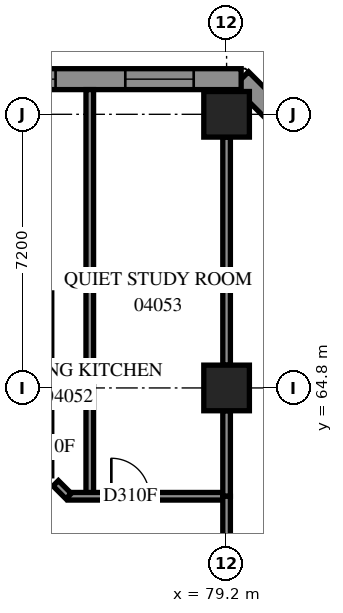
"""IFC4 building model, lengths in metres.
Left out: names, types, materials, properties, quantities, classifications, styles, units other than length and angle.
Written with IfcOpenShell. Run it as: python <this file> out.ifc"""

import sys

from ifc_helpers import new_model, si_unit, direction, frame, frame_2d, origin, origin_2d, place, context, subcontext, project, spatial, polyline, rectangle, outline, extrude, element, fill, save


model = new_model("IFC4")
c1 = context("Model", 3, precision=1e-05, world=origin(), true_north=direction((0.0, 1.0)))
c2 = subcontext(c1, "Body", "Model", "MODEL_VIEW")
j1 = project(units=[si_unit("LENGTHUNIT", "METRE"), si_unit("PLANEANGLEUNIT", "RADIAN")], contexts=[c1])
p1 = place(None, origin())
s1 = spatial("IfcSite", under=j1, at=p1, CompositionType="ELEMENT")
p2 = place(p1, origin())
s2 = spatial("IfcBuilding", under=s1, at=p2, CompositionType="ELEMENT")
p3 = place(p2, frame((0.0, 0.0, 18.6)))
s3 = spatial("IfcBuildingStorey", under=s2, at=p3, CompositionType="ELEMENT", Elevation=18.6)
for number, where, z_axis, x_axis in (
    (1, (79.2, 64.8, 0.0), (0.0, 0.0, 1.0), (1.0, 0.0, 0.0)),
    (2, (79.2, 72.0, 0.0), (0.0, 0.0, 1.0), (1.0, 0.0, 0.0)),
):
    element("IfcColumn", number, at=place(p3, frame(where, z_axis=z_axis, x_axis=x_axis)), inside=s3, PredefinedType="COLUMN", context=c2, shape_type="SweptSolid", body=[
        extrude(rectangle(XDim=1.2, YDim=1.2, at=origin_2d()), origin(), (0.0, 0.0, 1.0), 3.8),
    ])
p4 = place(p3, frame((117.843, 34.665, 0.0), z_axis=(0.0, 0.0, 1.0), x_axis=(-0.7071067812, 0.7071067812, 0.0)))
e3 = element("IfcWall", 3, at=p4, inside=s3, PredefinedType="SOLIDWALL", context=c2, shape_type="SweptSolid", body=[
    extrude(outline(polyline([(-0.275, -0.275), (54.222, -0.275), (53.994, 0.275), (0.275, 0.275), (-0.275, -0.275)])), origin(), (0.0, 0.0, 1.0), 3.8),
])
p5 = place(p4, frame((0.8, 0.0, 0.7)))
e4 = element("IfcOpeningElement", 4, at=p5, cuts=e3, PredefinedType="OPENING", context=c2, shape_type="SweptSolid", body=[
    extrude(rectangle(XDim=1.8, YDim=2.4, at=frame_2d((0.9, 1.2))), frame((0.0, 0.285, 0.0), z_axis=(0.0, -1.0, 0.0), x_axis=(1.0, 0.0, 0.0)), (0.0, 0.0, 1.0), 0.57),
])
p6 = place(p4, frame((4.225, 0.0, 0.7)))
e5 = element("IfcOpeningElement", 5, at=p6, cuts=e3, PredefinedType="OPENING", context=c2, shape_type="SweptSolid", body=[
    extrude(rectangle(XDim=1.8, YDim=2.4, at=frame_2d((0.9, 1.2))), frame((0.0, 0.285, 0.0), z_axis=(0.0, -1.0, 0.0), x_axis=(1.0, 0.0, 0.0)), (0.0, 0.0, 1.0), 0.57),
])
p7 = place(p4, frame((7.825, 0.0, 0.7)))
e6 = element("IfcOpeningElement", 6, at=p7, cuts=e3, PredefinedType="OPENING", context=c2, shape_type="SweptSolid", body=[
    extrude(rectangle(XDim=1.8, YDim=2.4, at=frame_2d((0.9, 1.2))), frame((0.0, 0.285, 0.0), z_axis=(0.0, -1.0, 0.0), x_axis=(1.0, 0.0, 0.0)), (0.0, 0.0, 1.0), 0.57),
])
p8 = place(p4, frame((11.425, 0.0, 0.7)))
e7 = element("IfcOpeningElement", 7, at=p8, cuts=e3, PredefinedType="OPENING", context=c2, shape_type="SweptSolid", body=[
    extrude(rectangle(XDim=1.8, YDim=2.4, at=frame_2d((0.9, 1.2))), frame((0.0, 0.285, 0.0), z_axis=(0.0, -1.0, 0.0), x_axis=(1.0, 0.0, 0.0)), (0.0, 0.0, 1.0), 0.57),
])
p9 = place(p4, frame((15.025, 0.0, 0.7)))
e8 = element("IfcOpeningElement", 8, at=p9, cuts=e3, PredefinedType="OPENING", context=c2, shape_type="SweptSolid", body=[
    extrude(rectangle(XDim=1.8, YDim=2.4, at=frame_2d((0.9, 1.2))), frame((0.0, 0.285, 0.0), z_axis=(0.0, -1.0, 0.0), x_axis=(1.0, 0.0, 0.0)), (0.0, 0.0, 1.0), 0.57),
])
p10 = place(p4, frame((18.625, 0.0, 0.7)))
e9 = element("IfcOpeningElement", 9, at=p10, cuts=e3, PredefinedType="OPENING", context=c2, shape_type="SweptSolid", body=[
    extrude(rectangle(XDim=1.8, YDim=2.4, at=frame_2d((0.9, 1.2))), frame((0.0, 0.285, 0.0), z_axis=(0.0, -1.0, 0.0), x_axis=(1.0, 0.0, 0.0)), (0.0, 0.0, 1.0), 0.57),
])
p11 = place(p4, frame((22.225, 0.0, 0.7)))
e10 = element("IfcOpeningElement", 10, at=p11, cuts=e3, PredefinedType="OPENING", context=c2, shape_type="SweptSolid", body=[
    extrude(rectangle(XDim=1.8, YDim=2.4, at=frame_2d((0.9, 1.2))), frame((0.0, 0.285, 0.0), z_axis=(0.0, -1.0, 0.0), x_axis=(1.0, 0.0, 0.0)), (0.0, 0.0, 1.0), 0.57),
])
p12 = place(p4, frame((25.825, 0.0, 0.7)))
e11 = element("IfcOpeningElement", 11, at=p12, cuts=e3, PredefinedType="OPENING", context=c2, shape_type="SweptSolid", body=[
    extrude(rectangle(XDim=1.8, YDim=2.4, at=frame_2d((0.9, 1.2))), frame((0.0, 0.285, 0.0), z_axis=(0.0, -1.0, 0.0), x_axis=(1.0, 0.0, 0.0)), (0.0, 0.0, 1.0), 0.57),
])
p13 = place(p4, frame((29.425, 0.0, 0.7)))
e12 = element("IfcOpeningElement", 12, at=p13, cuts=e3, PredefinedType="OPENING", context=c2, shape_type="SweptSolid", body=[
    extrude(rectangle(XDim=1.8, YDim=2.4, at=frame_2d((0.9, 1.2))), frame((0.0, 0.285, 0.0), z_axis=(0.0, -1.0, 0.0), x_axis=(1.0, 0.0, 0.0)), (0.0, 0.0, 1.0), 0.57),
])
p14 = place(p4, frame((33.025, 0.0, 0.7)))
e13 = element("IfcOpeningElement", 13, at=p14, cuts=e3, PredefinedType="OPENING", context=c2, shape_type="SweptSolid", body=[
    extrude(rectangle(XDim=1.8, YDim=2.4, at=frame_2d((0.9, 1.2))), frame((0.0, 0.285, 0.0), z_axis=(0.0, -1.0, 0.0), x_axis=(1.0, 0.0, 0.0)), (0.0, 0.0, 1.0), 0.57),
])
p15 = place(p4, frame((36.625, 0.0, 0.7)))
e14 = element("IfcOpeningElement", 14, at=p15, cuts=e3, PredefinedType="OPENING", context=c2, shape_type="SweptSolid", body=[
    extrude(rectangle(XDim=1.8, YDim=2.4, at=frame_2d((0.9, 1.2))), frame((0.0, 0.285, 0.0), z_axis=(0.0, -1.0, 0.0), x_axis=(1.0, 0.0, 0.0)), (0.0, 0.0, 1.0), 0.57),
])
p16 = place(p4, frame((40.225, 0.0, 0.7)))
e15 = element("IfcOpeningElement", 15, at=p16, cuts=e3, PredefinedType="OPENING", context=c2, shape_type="SweptSolid", body=[
    extrude(rectangle(XDim=1.8, YDim=2.4, at=frame_2d((0.9, 1.2))), frame((0.0, 0.285, 0.0), z_axis=(0.0, -1.0, 0.0), x_axis=(1.0, 0.0, 0.0)), (0.0, 0.0, 1.0), 0.57),
])
p17 = place(p4, frame((43.825, 0.0, 0.7)))
e16 = element("IfcOpeningElement", 16, at=p17, cuts=e3, PredefinedType="OPENING", context=c2, shape_type="SweptSolid", body=[
    extrude(rectangle(XDim=1.8, YDim=2.4, at=frame_2d((0.9, 1.2))), frame((0.0, 0.285, 0.0), z_axis=(0.0, -1.0, 0.0), x_axis=(1.0, 0.0, 0.0)), (0.0, 0.0, 1.0), 0.57),
])
p18 = place(p4, frame((47.425, 0.0, 0.7)))
e17 = element("IfcOpeningElement", 17, at=p18, cuts=e3, PredefinedType="OPENING", context=c2, shape_type="SweptSolid", body=[
    extrude(rectangle(XDim=1.8, YDim=2.4, at=frame_2d((0.9, 1.2))), frame((0.0, 0.285, 0.0), z_axis=(0.0, -1.0, 0.0), x_axis=(1.0, 0.0, 0.0)), (0.0, 0.0, 1.0), 0.57),
])
p19 = place(p4, frame((51.06, 0.0, 0.7)))
e18 = element("IfcOpeningElement", 18, at=p19, cuts=e3, PredefinedType="OPENING", context=c2, shape_type="SweptSolid", body=[
    extrude(rectangle(XDim=1.8, YDim=2.4, at=frame_2d((0.9, 1.2))), frame((0.0, 0.285, 0.0), z_axis=(0.0, -1.0, 0.0), x_axis=(1.0, 0.0, 0.0)), (0.0, 0.0, 1.0), 0.57),
])
p20 = place(p3, frame((79.583, 72.925, 0.0), z_axis=(0.0, 0.0, 1.0), x_axis=(-1.0, 0.0, 0.0)))
e19 = element("IfcWall", 19, at=p20, inside=s3, PredefinedType="SOLIDWALL", context=c2, shape_type="SweptSolid", body=[
    extrude(outline(polyline([(-0.114, -0.275), (79.583, -0.275), (79.033, 0.275), (0.114, 0.275), (-0.114, -0.275)])), origin(), (0.0, 0.0, 1.0), 3.8),
])
p21 = place(p20, frame((1.249, 0.0, 0.7)))
e20 = element("IfcOpeningElement", 20, at=p21, cuts=e19, PredefinedType="OPENING", context=c2, shape_type="SweptSolid", body=[
    extrude(rectangle(XDim=1.8, YDim=2.4, at=frame_2d((0.9, 1.2))), frame((0.0, 0.285, 0.0), z_axis=(0.0, -1.0, 0.0), x_axis=(1.0, 0.0, 0.0)), (0.0, 0.0, 1.0), 0.57),
])
p22 = place(p20, frame((4.883, 0.0, 0.7)))
e21 = element("IfcOpeningElement", 21, at=p22, cuts=e19, PredefinedType="OPENING", context=c2, shape_type="SweptSolid", body=[
    extrude(rectangle(XDim=1.8, YDim=2.4, at=frame_2d((0.9, 1.2))), frame((0.0, 0.285, 0.0), z_axis=(0.0, -1.0, 0.0), x_axis=(1.0, 0.0, 0.0)), (0.0, 0.0, 1.0), 0.57),
])
p23 = place(p20, frame((8.483, 0.0, 0.7)))
e22 = element("IfcOpeningElement", 22, at=p23, cuts=e19, PredefinedType="OPENING", context=c2, shape_type="SweptSolid", body=[
    extrude(rectangle(XDim=1.8, YDim=2.4, at=frame_2d((0.9, 1.2))), frame((0.0, 0.285, 0.0), z_axis=(0.0, -1.0, 0.0), x_axis=(1.0, 0.0, 0.0)), (0.0, 0.0, 1.0), 0.57),
])
p24 = place(p20, frame((12.083, 0.0, 0.7)))
e23 = element("IfcOpeningElement", 23, at=p24, cuts=e19, PredefinedType="OPENING", context=c2, shape_type="SweptSolid", body=[
    extrude(rectangle(XDim=1.8, YDim=2.4, at=frame_2d((0.9, 1.2))), frame((0.0, 0.285, 0.0), z_axis=(0.0, -1.0, 0.0), x_axis=(1.0, 0.0, 0.0)), (0.0, 0.0, 1.0), 0.57),
])
p25 = place(p20, frame((15.683, 0.0, 0.7)))
e24 = element("IfcOpeningElement", 24, at=p25, cuts=e19, PredefinedType="OPENING", context=c2, shape_type="SweptSolid", body=[
    extrude(rectangle(XDim=1.8, YDim=2.4, at=frame_2d((0.9, 1.2))), frame((0.0, 0.285, 0.0), z_axis=(0.0, -1.0, 0.0), x_axis=(1.0, 0.0, 0.0)), (0.0, 0.0, 1.0), 0.57),
])
p26 = place(p20, frame((19.283, 0.0, 0.7)))
e25 = element("IfcOpeningElement", 25, at=p26, cuts=e19, PredefinedType="OPENING", context=c2, shape_type="SweptSolid", body=[
    extrude(rectangle(XDim=1.8, YDim=2.4, at=frame_2d((0.9, 1.2))), frame((0.0, 0.285, 0.0), z_axis=(0.0, -1.0, 0.0), x_axis=(1.0, 0.0, 0.0)), (0.0, 0.0, 1.0), 0.57),
])
p27 = place(p20, frame((22.883, 0.0, 0.7)))
e26 = element("IfcOpeningElement", 26, at=p27, cuts=e19, PredefinedType="OPENING", context=c2, shape_type="SweptSolid", body=[
    extrude(rectangle(XDim=1.8, YDim=2.4, at=frame_2d((0.9, 1.2))), frame((0.0, 0.285, 0.0), z_axis=(0.0, -1.0, 0.0), x_axis=(1.0, 0.0, 0.0)), (0.0, 0.0, 1.0), 0.57),
])
p28 = place(p20, frame((26.483, 0.0, 0.7)))
e27 = element("IfcOpeningElement", 27, at=p28, cuts=e19, PredefinedType="OPENING", context=c2, shape_type="SweptSolid", body=[
    extrude(rectangle(XDim=1.8, YDim=2.4, at=frame_2d((0.9, 1.2))), frame((0.0, 0.285, 0.0), z_axis=(0.0, -1.0, 0.0), x_axis=(1.0, 0.0, 0.0)), (0.0, 0.0, 1.0), 0.57),
])
p29 = place(p20, frame((30.083, 0.0, 0.7)))
e28 = element("IfcOpeningElement", 28, at=p29, cuts=e19, PredefinedType="OPENING", context=c2, shape_type="SweptSolid", body=[
    extrude(rectangle(XDim=1.8, YDim=2.4, at=frame_2d((0.9, 1.2))), frame((0.0, 0.285, 0.0), z_axis=(0.0, -1.0, 0.0), x_axis=(1.0, 0.0, 0.0)), (0.0, 0.0, 1.0), 0.57),
])
p30 = place(p20, frame((33.683, 0.0, 0.7)))
e29 = element("IfcOpeningElement", 29, at=p30, cuts=e19, PredefinedType="OPENING", context=c2, shape_type="SweptSolid", body=[
    extrude(rectangle(XDim=1.8, YDim=2.4, at=frame_2d((0.9, 1.2))), frame((0.0, 0.285, 0.0), z_axis=(0.0, -1.0, 0.0), x_axis=(1.0, 0.0, 0.0)), (0.0, 0.0, 1.0), 0.57),
])
p31 = place(p20, frame((37.283, 0.0, 0.7)))
e30 = element("IfcOpeningElement", 30, at=p31, cuts=e19, PredefinedType="OPENING", context=c2, shape_type="SweptSolid", body=[
    extrude(rectangle(XDim=1.8, YDim=2.4, at=frame_2d((0.9, 1.2))), frame((0.0, 0.285, 0.0), z_axis=(0.0, -1.0, 0.0), x_axis=(1.0, 0.0, 0.0)), (0.0, 0.0, 1.0), 0.57),
])
p32 = place(p20, frame((40.883, 0.0, 0.7)))
e31 = element("IfcOpeningElement", 31, at=p32, cuts=e19, PredefinedType="OPENING", context=c2, shape_type="SweptSolid", body=[
    extrude(rectangle(XDim=1.8, YDim=2.4, at=frame_2d((0.9, 1.2))), frame((0.0, 0.285, 0.0), z_axis=(0.0, -1.0, 0.0), x_axis=(1.0, 0.0, 0.0)), (0.0, 0.0, 1.0), 0.57),
])
p33 = place(p20, frame((44.483, 0.0, 0.7)))
e32 = element("IfcOpeningElement", 32, at=p33, cuts=e19, PredefinedType="OPENING", context=c2, shape_type="SweptSolid", body=[
    extrude(rectangle(XDim=1.8, YDim=2.4, at=frame_2d((0.9, 1.2))), frame((0.0, 0.285, 0.0), z_axis=(0.0, -1.0, 0.0), x_axis=(1.0, 0.0, 0.0)), (0.0, 0.0, 1.0), 0.57),
])
p34 = place(p20, frame((48.083, 0.0, 0.7)))
e33 = element("IfcOpeningElement", 33, at=p34, cuts=e19, PredefinedType="OPENING", context=c2, shape_type="SweptSolid", body=[
    extrude(rectangle(XDim=1.8, YDim=2.4, at=frame_2d((0.9, 1.2))), frame((0.0, 0.285, 0.0), z_axis=(0.0, -1.0, 0.0), x_axis=(1.0, 0.0, 0.0)), (0.0, 0.0, 1.0), 0.57),
])
p35 = place(p20, frame((51.683, 0.0, 0.7)))
e34 = element("IfcOpeningElement", 34, at=p35, cuts=e19, PredefinedType="OPENING", context=c2, shape_type="SweptSolid", body=[
    extrude(rectangle(XDim=1.8, YDim=2.4, at=frame_2d((0.9, 1.2))), frame((0.0, 0.285, 0.0), z_axis=(0.0, -1.0, 0.0), x_axis=(1.0, 0.0, 0.0)), (0.0, 0.0, 1.0), 0.57),
])
p36 = place(p20, frame((55.283, 0.0, 0.7)))
e35 = element("IfcOpeningElement", 35, at=p36, cuts=e19, PredefinedType="OPENING", context=c2, shape_type="SweptSolid", body=[
    extrude(rectangle(XDim=1.8, YDim=2.4, at=frame_2d((0.9, 1.2))), frame((0.0, 0.285, 0.0), z_axis=(0.0, -1.0, 0.0), x_axis=(1.0, 0.0, 0.0)), (0.0, 0.0, 1.0), 0.57),
])
p37 = place(p20, frame((58.883, 0.0, 0.7)))
e36 = element("IfcOpeningElement", 36, at=p37, cuts=e19, PredefinedType="OPENING", context=c2, shape_type="SweptSolid", body=[
    extrude(rectangle(XDim=1.8, YDim=2.4, at=frame_2d((0.9, 1.2))), frame((0.0, 0.285, 0.0), z_axis=(0.0, -1.0, 0.0), x_axis=(1.0, 0.0, 0.0)), (0.0, 0.0, 1.0), 0.57),
])
p38 = place(p20, frame((62.483, 0.0, 0.7)))
e37 = element("IfcOpeningElement", 37, at=p38, cuts=e19, PredefinedType="OPENING", context=c2, shape_type="SweptSolid", body=[
    extrude(rectangle(XDim=1.8, YDim=2.4, at=frame_2d((0.9, 1.2))), frame((0.0, 0.285, 0.0), z_axis=(0.0, -1.0, 0.0), x_axis=(1.0, 0.0, 0.0)), (0.0, 0.0, 1.0), 0.57),
])
p39 = place(p20, frame((66.083, 0.0, 0.7)))
e38 = element("IfcOpeningElement", 38, at=p39, cuts=e19, PredefinedType="OPENING", context=c2, shape_type="SweptSolid", body=[
    extrude(rectangle(XDim=1.8, YDim=2.4, at=frame_2d((0.9, 1.2))), frame((0.0, 0.285, 0.0), z_axis=(0.0, -1.0, 0.0), x_axis=(1.0, 0.0, 0.0)), (0.0, 0.0, 1.0), 0.57),
])
p40 = place(p20, frame((69.683, 0.0, 0.7)))
e39 = element("IfcOpeningElement", 39, at=p40, cuts=e19, PredefinedType="OPENING", context=c2, shape_type="SweptSolid", body=[
    extrude(rectangle(XDim=1.8, YDim=2.4, at=frame_2d((0.9, 1.2))), frame((0.0, 0.285, 0.0), z_axis=(0.0, -1.0, 0.0), x_axis=(1.0, 0.0, 0.0)), (0.0, 0.0, 1.0), 0.57),
])
p41 = place(p20, frame((73.683, 0.0, 0.7)))
e40 = element("IfcOpeningElement", 40, at=p41, cuts=e19, PredefinedType="OPENING", context=c2, shape_type="SweptSolid", body=[
    extrude(rectangle(XDim=1.8, YDim=2.4, at=frame_2d((0.9, 1.2))), frame((0.0, 0.285, 0.0), z_axis=(0.0, -1.0, 0.0), x_axis=(1.0, 0.0, 0.0)), (0.0, 0.0, 1.0), 0.57),
])
p42 = place(p20, frame((76.508, 0.0, 0.7)))
e41 = element("IfcOpeningElement", 41, at=p42, cuts=e19, PredefinedType="OPENING", context=c2, shape_type="SweptSolid", body=[
    extrude(rectangle(XDim=1.8, YDim=2.4, at=frame_2d((0.9, 1.2))), frame((0.0, 0.285, 0.0), z_axis=(0.0, -1.0, 0.0), x_axis=(1.0, 0.0, 0.0)), (0.0, 0.0, 1.0), 0.57),
])
p43 = place(p3, frame((75.6, 61.95, 0.0), z_axis=(0.0, 0.0, 1.0), x_axis=(0.0, 1.0, 0.0)))
e42 = element("IfcWall", 42, at=p43, inside=s3, PredefinedType="PARTITIONING", context=c2, shape_type="SweptSolid", body=[
    extrude(rectangle(XDim=10.7, YDim=0.2, at=frame_2d((5.35, 0.0))), origin(), (0.0, 0.0, 1.0), 3.8),
])
p44 = place(p3, frame((79.2, 65.4, 0.0), z_axis=(0.0, 0.0, 1.0), x_axis=(0.0, 1.0, 0.0)))
e43 = element("IfcWall", 43, at=p44, inside=s3, PredefinedType="PARTITIONING", context=c2, shape_type="SweptSolid", body=[
    extrude(rectangle(XDim=6.0, YDim=0.2, at=frame_2d((3.0, 0.0))), origin(), (0.0, 0.0, 1.0), 3.8),
])
p45 = place(p3, frame((75.038, 61.95, 0.0), z_axis=(0.0, 0.0, 1.0), x_axis=(1.0, 0.0, 0.0)))
e44 = element("IfcWall", 44, at=p45, inside=s3, PredefinedType="PARTITIONING", context=c2, shape_type="SweptSolid", body=[
    extrude(rectangle(XDim=4.162, YDim=0.2, at=frame_2d((2.081, 0.0))), origin(), (0.0, 0.0, 1.0), 3.8),
])
p46 = place(p45, frame((1.129, 0.0, 0.0)))
e45 = element("IfcOpeningElement", 45, at=p46, cuts=e44, PredefinedType="OPENING", context=c2, shape_type="SweptSolid", body=[
    extrude(rectangle(XDim=1.0, YDim=2.1, at=frame_2d((0.5, 1.05))), frame((0.0, 0.11, 0.0), z_axis=(0.0, -1.0, 0.0), x_axis=(1.0, 0.0, 0.0)), (0.0, 0.0, 1.0), 0.22),
])
p47 = place(p3, frame((79.2, 61.95, 0.0), z_axis=(0.0, 0.0, 1.0), x_axis=(0.0, 1.0, 0.0)))
e46 = element("IfcWall", 46, at=p47, inside=s3, PredefinedType="PARTITIONING", context=c2, shape_type="SweptSolid", body=[
    extrude(rectangle(XDim=2.25, YDim=0.2, at=frame_2d((1.125, 0.0))), origin(), (0.0, 0.0, 1.0), 3.8),
])
p48 = place(p3, frame((79.2, 60.45, 0.0), z_axis=(0.0, 0.0, 1.0), x_axis=(0.0, 1.0, 0.0)))
e47 = element("IfcWall", 47, at=p48, inside=s3, PredefinedType="PARTITIONING", context=c2, shape_type="SweptSolid", body=[
    extrude(rectangle(XDim=1.5, YDim=0.2, at=frame_2d((0.75, 0.0))), origin(), (0.0, 0.0, 1.0), 3.8),
])
p49 = place(p3, frame((74.703, 62.291, 0.0), z_axis=(0.0, 0.0, 1.0), x_axis=(0.7071067812, -0.7071067812, 0.0)))
e48 = element("IfcWall", 48, at=p49, inside=s3, PredefinedType="PARTITIONING", context=c2, shape_type="SweptSolid", body=[
    extrude(rectangle(XDim=0.478, YDim=0.2, at=frame_2d((0.239, 0.0))), origin(), (0.0, 0.0, 1.0), 3.8),
])
p50 = place(p21, origin())
e49 = element("IfcWindow", 49, at=p50, inside=s3, PartitioningType="SINGLE_PANEL", PredefinedType="WINDOW", context=c2, shape_type="SweptSolid", body=[
    extrude(rectangle(XDim=1.8, YDim=2.4, at=frame_2d((0.9, 1.2))), frame((0.0, 0.155, 0.0), z_axis=(0.0, -1.0, 0.0), x_axis=(1.0, 0.0, 0.0)), (0.0, 0.0, 1.0), 0.06),
])
fill(e20, e49)
p51 = place(p22, origin())
e50 = element("IfcWindow", 50, at=p51, inside=s3, PartitioningType="SINGLE_PANEL", PredefinedType="WINDOW", context=c2, shape_type="SweptSolid", body=[
    extrude(rectangle(XDim=1.8, YDim=2.4, at=frame_2d((0.9, 1.2))), frame((0.0, 0.155, 0.0), z_axis=(0.0, -1.0, 0.0), x_axis=(1.0, 0.0, 0.0)), (0.0, 0.0, 1.0), 0.06),
])
fill(e21, e50)
p52 = place(p46, origin())
e51 = element("IfcDoor", 51, at=p52, inside=s3, OperationType="SINGLE_SWING_LEFT", PredefinedType="DOOR", context=c2, shape_type="SweptSolid", body=[
    extrude(rectangle(XDim=1.0, YDim=2.1, at=frame_2d((0.5, 1.05))), frame((0.0, 0.025, 0.0), z_axis=(0.0, -1.0, 0.0), x_axis=(1.0, 0.0, 0.0)), (0.0, 0.0, 1.0), 0.05),
])
fill(e45, e51)
save(model, sys.argv[1])
